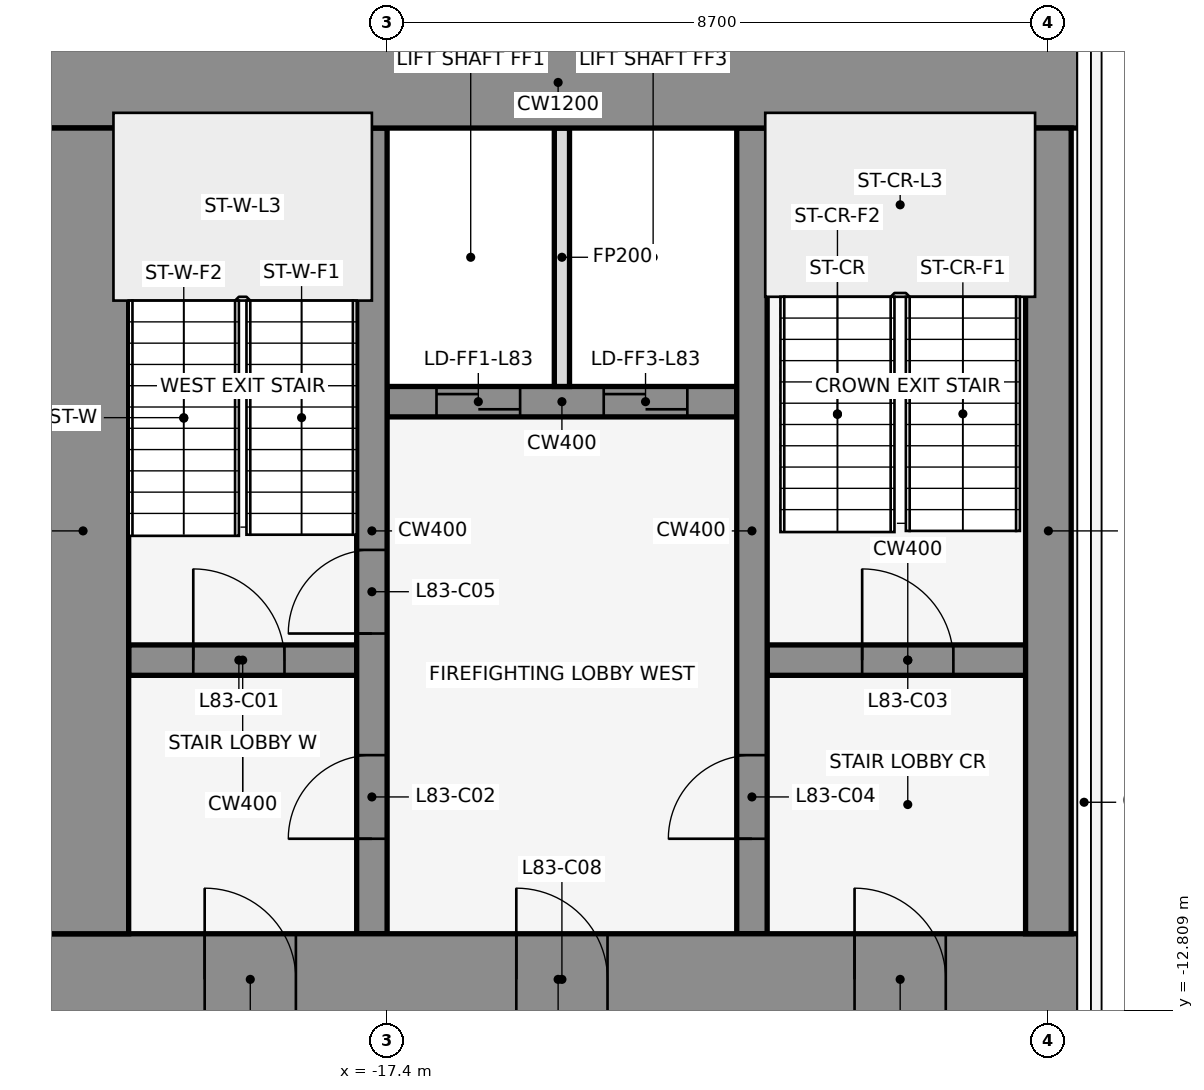
"""IFC4 building model, lengths in metres.
Left out: names, types, materials, properties, quantities, classifications, styles, units other than length and angle.
Written with IfcOpenShell. Run it as: python <this file> out.ifc"""

import sys

from ifc_helpers import new_model, si_unit, direction, frame, frame_2d, origin, place, context, subcontext, project, spatial, rectangle, extrude, element, fill, save


model = new_model("IFC4")
c1 = context("Model", 3, precision=1e-05, world=origin(), true_north=direction((0.0, 1.0)))
c2 = subcontext(c1, "Body", "Model", "MODEL_VIEW")
j1 = project(units=[si_unit("LENGTHUNIT", "METRE"), si_unit("PLANEANGLEUNIT", "RADIAN")], contexts=[c1])
p1 = place(None, origin())
s1 = spatial("IfcSite", under=j1, at=p1, CompositionType="ELEMENT")
p2 = place(p1, origin())
s2 = spatial("IfcBuilding", under=s1, at=p2, CompositionType="ELEMENT")
p3 = place(p2, frame((0.0, 0.0, 370.4)))
s3 = spatial("IfcBuildingStorey", under=s2, at=p3, CompositionType="ELEMENT", Elevation=370.4)
p4 = place(p3, frame((-20.8, -8.2, 0.0), z_axis=(0.0, 0.0, 1.0), x_axis=(1.0, 0.0, 0.0)))
e1 = element("IfcWall", 1, at=p4, inside=s3, PredefinedType="SHEAR", context=c2, shape_type="SweptSolid", body=[
    extrude(rectangle(XDim=3.0, YDim=0.4, at=frame_2d((1.5, 0.0))), origin(), (0.0, 0.0, 1.0), 4.5),
])
p5 = place(p4, frame((0.85, 0.0, 0.0)))
e2 = element("IfcOpeningElement", 2, at=p5, cuts=e1, PredefinedType="OPENING", context=c2, shape_type="SweptSolid", body=[
    extrude(rectangle(XDim=1.2, YDim=2.1, at=frame_2d((0.6, 1.05))), frame((0.0, 0.212, 0.0), z_axis=(0.0, -1.0, 0.0), x_axis=(1.0, 0.0, 0.0)), (0.0, 0.0, 1.0), 0.424),
])
p6 = place(p3, frame((-12.4, -8.2, 0.0), z_axis=(0.0, 0.0, 1.0), x_axis=(1.0, 0.0, 0.0)))
e3 = element("IfcWall", 3, at=p6, inside=s3, PredefinedType="SHEAR", context=c2, shape_type="SweptSolid", body=[
    extrude(rectangle(XDim=3.7, YDim=0.4, at=frame_2d((1.85, 0.0))), origin(), (0.0, 0.0, 1.0), 4.5),
])
p7 = place(p6, frame((1.25, 0.0, 0.0)))
e4 = element("IfcOpeningElement", 4, at=p7, cuts=e3, PredefinedType="OPENING", context=c2, shape_type="SweptSolid", body=[
    extrude(rectangle(XDim=1.2, YDim=2.1, at=frame_2d((0.6, 1.05))), frame((0.0, 0.212, 0.0), z_axis=(0.0, -1.0, 0.0), x_axis=(1.0, 0.0, 0.0)), (0.0, 0.0, 1.0), 0.424),
])
p8 = place(p3, frame((-17.4, -4.8, 0.0), z_axis=(0.0, 0.0, 1.0), x_axis=(1.0, 0.0, 0.0)))
e5 = element("IfcWall", 5, at=p8, inside=s3, PredefinedType="SHEAR", context=c2, shape_type="SweptSolid", body=[
    extrude(rectangle(XDim=4.6, YDim=0.4, at=frame_2d((2.3, 0.0))), origin(), (0.0, 0.0, 1.0), 4.5),
])
p9 = place(p8, frame((0.65, 0.0, 0.0)))
e6 = element("IfcOpeningElement", 6, at=p9, cuts=e5, PredefinedType="OPENING", context=c2, shape_type="SweptSolid", body=[
    extrude(rectangle(XDim=1.1, YDim=2.1, at=frame_2d((0.55, 1.05))), frame((0.0, 0.212, 0.0), z_axis=(0.0, -1.0, 0.0), x_axis=(1.0, 0.0, 0.0)), (0.0, 0.0, 1.0), 0.424),
])
p10 = place(p8, frame((2.85, 0.0, 0.0)))
e7 = element("IfcOpeningElement", 7, at=p10, cuts=e5, PredefinedType="OPENING", context=c2, shape_type="SweptSolid", body=[
    extrude(rectangle(XDim=1.1, YDim=2.1, at=frame_2d((0.55, 1.05))), frame((0.0, 0.212, 0.0), z_axis=(0.0, -1.0, 0.0), x_axis=(1.0, 0.0, 0.0)), (0.0, 0.0, 1.0), 0.424),
])
p11 = place(p3, frame((-17.6, -11.8, 0.0), z_axis=(0.0, 0.0, 1.0), x_axis=(0.0, 1.0, 0.0)))
e8 = element("IfcWall", 8, at=p11, inside=s3, PredefinedType="SHEAR", context=c2, shape_type="SweptSolid", body=[
    extrude(rectangle(XDim=10.6, YDim=0.4, at=frame_2d((5.3, 0.0))), origin(), (0.0, 0.0, 1.0), 4.5),
])
p12 = place(p11, frame((1.25, 0.0, 0.0)))
e9 = element("IfcOpeningElement", 9, at=p12, cuts=e8, PredefinedType="OPENING", context=c2, shape_type="SweptSolid", body=[
    extrude(rectangle(XDim=1.1, YDim=2.1, at=frame_2d((0.55, 1.05))), frame((0.0, 0.212, 0.0), z_axis=(0.0, -1.0, 0.0), x_axis=(1.0, 0.0, 0.0)), (0.0, 0.0, 1.0), 0.424),
])
p13 = place(p11, frame((3.95, 0.0, 0.0)))
e10 = element("IfcOpeningElement", 10, at=p13, cuts=e8, PredefinedType="OPENING", context=c2, shape_type="SweptSolid", body=[
    extrude(rectangle(XDim=1.1, YDim=2.1, at=frame_2d((0.55, 1.05))), frame((0.0, 0.212, 0.0), z_axis=(0.0, -1.0, 0.0), x_axis=(1.0, 0.0, 0.0)), (0.0, 0.0, 1.0), 0.424),
])
p14 = place(p3, frame((-15.1, -4.6, 0.0), z_axis=(0.0, 0.0, 1.0), x_axis=(0.0, 1.0, 0.0)))
e11 = element("IfcWall", 11, at=p14, inside=s3, PredefinedType="PARTITIONING", context=c2, shape_type="SweptSolid", body=[
    extrude(rectangle(XDim=3.4, YDim=0.2, at=frame_2d((1.7, 0.0))), origin(), (0.0, 0.0, 1.0), 3.368),
])
p15 = place(p3, frame((-12.6, -11.8, 0.0), z_axis=(0.0, 0.0, 1.0), x_axis=(0.0, 1.0, 0.0)))
e12 = element("IfcWall", 12, at=p15, inside=s3, PredefinedType="SHEAR", context=c2, shape_type="SweptSolid", body=[
    extrude(rectangle(XDim=10.6, YDim=0.4, at=frame_2d((5.3, 0.0))), origin(), (0.0, 0.0, 1.0), 4.5),
])
p16 = place(p15, frame((1.25, 0.0, 0.0)))
e13 = element("IfcOpeningElement", 13, at=p16, cuts=e12, PredefinedType="OPENING", context=c2, shape_type="SweptSolid", body=[
    extrude(rectangle(XDim=1.1, YDim=2.1, at=frame_2d((0.55, 1.05))), frame((0.0, 0.212, 0.0), z_axis=(0.0, -1.0, 0.0), x_axis=(1.0, 0.0, 0.0)), (0.0, 0.0, 1.0), 0.424),
])
p17 = place(p3, frame((-22.0, -0.6, 0.0), z_axis=(0.0, 0.0, 1.0), x_axis=(1.0, 0.0, 0.0)))
e14 = element("IfcWall", 14, at=p17, inside=s3, PredefinedType="SHEAR", context=c2, shape_type="SweptSolid", body=[
    extrude(rectangle(XDim=13.7, YDim=1.2, at=frame_2d((6.85, 0.0))), origin(), (0.0, 0.0, 1.0), 4.5),
])
p18 = place(p3, frame((-22.0, -12.4, 0.0), z_axis=(0.0, 0.0, 1.0), x_axis=(1.0, 0.0, 0.0)))
e15 = element("IfcWall", 15, at=p18, inside=s3, PredefinedType="SHEAR", context=c2, shape_type="SweptSolid", body=[
    extrude(rectangle(XDim=13.7, YDim=1.2, at=frame_2d((6.85, 0.0))), origin(), (0.0, 0.0, 1.0), 4.5),
])
p19 = place(p18, frame((2.2, 0.0, 0.0)))
e16 = element("IfcOpeningElement", 16, at=p19, cuts=e15, PredefinedType="OPENING", context=c2, shape_type="SweptSolid", body=[
    extrude(rectangle(XDim=1.2, YDim=2.1, at=frame_2d((0.6, 1.05))), frame((0.0, 0.612, 0.0), z_axis=(0.0, -1.0, 0.0), x_axis=(1.0, 0.0, 0.0)), (0.0, 0.0, 1.0), 1.224),
])
p20 = place(p18, frame((10.75, 0.0, 0.0)))
e17 = element("IfcOpeningElement", 17, at=p20, cuts=e15, PredefinedType="OPENING", context=c2, shape_type="SweptSolid", body=[
    extrude(rectangle(XDim=1.2, YDim=2.1, at=frame_2d((0.6, 1.05))), frame((0.0, 0.612, 0.0), z_axis=(0.0, -1.0, 0.0), x_axis=(1.0, 0.0, 0.0)), (0.0, 0.0, 1.0), 1.224),
])
p21 = place(p18, frame((6.3, 0.0, 0.0)))
e18 = element("IfcOpeningElement", 18, at=p21, cuts=e15, PredefinedType="OPENING", context=c2, shape_type="SweptSolid", body=[
    extrude(rectangle(XDim=1.2, YDim=2.1, at=frame_2d((0.6, 1.05))), frame((0.0, 0.612, 0.0), z_axis=(0.0, -1.0, 0.0), x_axis=(1.0, 0.0, 0.0)), (0.0, 0.0, 1.0), 1.224),
])
p22 = place(p3, frame((-21.4, -11.8, 0.0), z_axis=(0.0, 0.0, 1.0), x_axis=(0.0, 1.0, 0.0)))
e19 = element("IfcWall", 19, at=p22, inside=s3, PredefinedType="SHEAR", context=c2, shape_type="SweptSolid", body=[
    extrude(rectangle(XDim=10.6, YDim=1.2, at=frame_2d((5.3, 0.0))), origin(), (0.0, 0.0, 1.0), 4.5),
])
p23 = place(p3, frame((-8.7, -11.8, 0.0), z_axis=(0.0, 0.0, 1.0), x_axis=(0.0, 1.0, 0.0)))
e20 = element("IfcWall", 20, at=p23, inside=s3, PredefinedType="SHEAR", context=c2, shape_type="SweptSolid", body=[
    extrude(rectangle(XDim=10.6, YDim=0.6, at=frame_2d((5.3, 0.0))), origin(), (0.0, 0.0, 1.0), 4.5),
])
p24 = place(p5, origin())
e21 = element("IfcDoor", 21, at=p24, inside=s3, OperationType="SINGLE_SWING_LEFT", PredefinedType="DOOR", context=c2, shape_type="SweptSolid", body=[
    extrude(rectangle(XDim=1.2, YDim=2.1, at=frame_2d((0.6, 1.05))), frame((0.0, 0.025, 0.0), z_axis=(0.0, -1.0, 0.0), x_axis=(1.0, 0.0, 0.0)), (0.0, 0.0, 1.0), 0.05),
])
fill(e2, e21)
p25 = place(p12, frame((1.1, 0.0, 0.0), z_axis=(0.0, 0.0, 1.0), x_axis=(-1.0, 0.0, 0.0)))
e22 = element("IfcDoor", 22, at=p25, inside=s3, OperationType="SINGLE_SWING_LEFT", PredefinedType="DOOR", context=c2, shape_type="SweptSolid", body=[
    extrude(rectangle(XDim=1.1, YDim=2.1, at=frame_2d((0.55, 1.05))), frame((0.0, 0.025, 0.0), z_axis=(0.0, -1.0, 0.0), x_axis=(1.0, 0.0, 0.0)), (0.0, 0.0, 1.0), 0.05),
])
fill(e9, e22)
p26 = place(p7, origin())
e23 = element("IfcDoor", 23, at=p26, inside=s3, OperationType="SINGLE_SWING_LEFT", PredefinedType="DOOR", context=c2, shape_type="SweptSolid", body=[
    extrude(rectangle(XDim=1.2, YDim=2.1, at=frame_2d((0.6, 1.05))), frame((0.0, 0.025, 0.0), z_axis=(0.0, -1.0, 0.0), x_axis=(1.0, 0.0, 0.0)), (0.0, 0.0, 1.0), 0.05),
])
fill(e4, e23)
p27 = place(p16, origin())
e24 = element("IfcDoor", 24, at=p27, inside=s3, OperationType="SINGLE_SWING_RIGHT", PredefinedType="DOOR", context=c2, shape_type="SweptSolid", body=[
    extrude(rectangle(XDim=1.1, YDim=2.1, at=frame_2d((0.55, 1.05))), frame((0.0, 0.025, 0.0), z_axis=(0.0, -1.0, 0.0), x_axis=(1.0, 0.0, 0.0)), (0.0, 0.0, 1.0), 0.05),
])
fill(e13, e24)
p28 = place(p9, origin())
e25 = element("IfcDoor", 25, at=p28, inside=s3, OperationType="DOUBLE_DOOR_SLIDING", PredefinedType="DOOR", context=c2, shape_type="SweptSolid", body=[
    extrude(rectangle(XDim=1.1, YDim=2.1, at=frame_2d((0.55, 1.05))), frame((0.0, 0.025, 0.0), z_axis=(0.0, -1.0, 0.0), x_axis=(1.0, 0.0, 0.0)), (0.0, 0.0, 1.0), 0.05),
])
fill(e6, e25)
p29 = place(p10, origin())
e26 = element("IfcDoor", 26, at=p29, inside=s3, OperationType="DOUBLE_DOOR_SLIDING", PredefinedType="DOOR", context=c2, shape_type="SweptSolid", body=[
    extrude(rectangle(XDim=1.1, YDim=2.1, at=frame_2d((0.55, 1.05))), frame((0.0, 0.025, 0.0), z_axis=(0.0, -1.0, 0.0), x_axis=(1.0, 0.0, 0.0)), (0.0, 0.0, 1.0), 0.05),
])
fill(e7, e26)
p30 = place(p13, frame((1.1, 0.0, 0.0), z_axis=(0.0, 0.0, 1.0), x_axis=(-1.0, 0.0, 0.0)))
e27 = element("IfcDoor", 27, at=p30, inside=s3, OperationType="SINGLE_SWING_RIGHT", PredefinedType="DOOR", context=c2, shape_type="SweptSolid", body=[
    extrude(rectangle(XDim=1.1, YDim=2.1, at=frame_2d((0.55, 1.05))), frame((0.0, 0.025, 0.0), z_axis=(0.0, -1.0, 0.0), x_axis=(1.0, 0.0, 0.0)), (0.0, 0.0, 1.0), 0.05),
])
fill(e10, e27)
p31 = place(p19, frame((1.2, 0.0, 0.0), z_axis=(0.0, 0.0, 1.0), x_axis=(-1.0, 0.0, 0.0)))
e28 = element("IfcDoor", 28, at=p31, inside=s3, OperationType="SINGLE_SWING_RIGHT", PredefinedType="DOOR", context=c2, shape_type="SweptSolid", body=[
    extrude(rectangle(XDim=1.2, YDim=2.1, at=frame_2d((0.6, 1.05))), frame((0.0, 0.025, 0.0), z_axis=(0.0, -1.0, 0.0), x_axis=(1.0, 0.0, 0.0)), (0.0, 0.0, 1.0), 0.05),
])
fill(e16, e28)
p32 = place(p20, frame((1.2, 0.0, 0.0), z_axis=(0.0, 0.0, 1.0), x_axis=(-1.0, 0.0, 0.0)))
e29 = element("IfcDoor", 29, at=p32, inside=s3, OperationType="SINGLE_SWING_RIGHT", PredefinedType="DOOR", context=c2, shape_type="SweptSolid", body=[
    extrude(rectangle(XDim=1.2, YDim=2.1, at=frame_2d((0.6, 1.05))), frame((0.0, 0.025, 0.0), z_axis=(0.0, -1.0, 0.0), x_axis=(1.0, 0.0, 0.0)), (0.0, 0.0, 1.0), 0.05),
])
fill(e17, e29)
p33 = place(p21, frame((1.2, 0.0, 0.0), z_axis=(0.0, 0.0, 1.0), x_axis=(-1.0, 0.0, 0.0)))
e30 = element("IfcDoor", 30, at=p33, inside=s3, OperationType="SINGLE_SWING_RIGHT", PredefinedType="DOOR", context=c2, shape_type="SweptSolid", body=[
    extrude(rectangle(XDim=1.2, YDim=2.1, at=frame_2d((0.6, 1.05))), frame((0.0, 0.025, 0.0), z_axis=(0.0, -1.0, 0.0), x_axis=(1.0, 0.0, 0.0)), (0.0, 0.0, 1.0), 0.05),
])
fill(e18, e30)
save(model, sys.argv[1])
